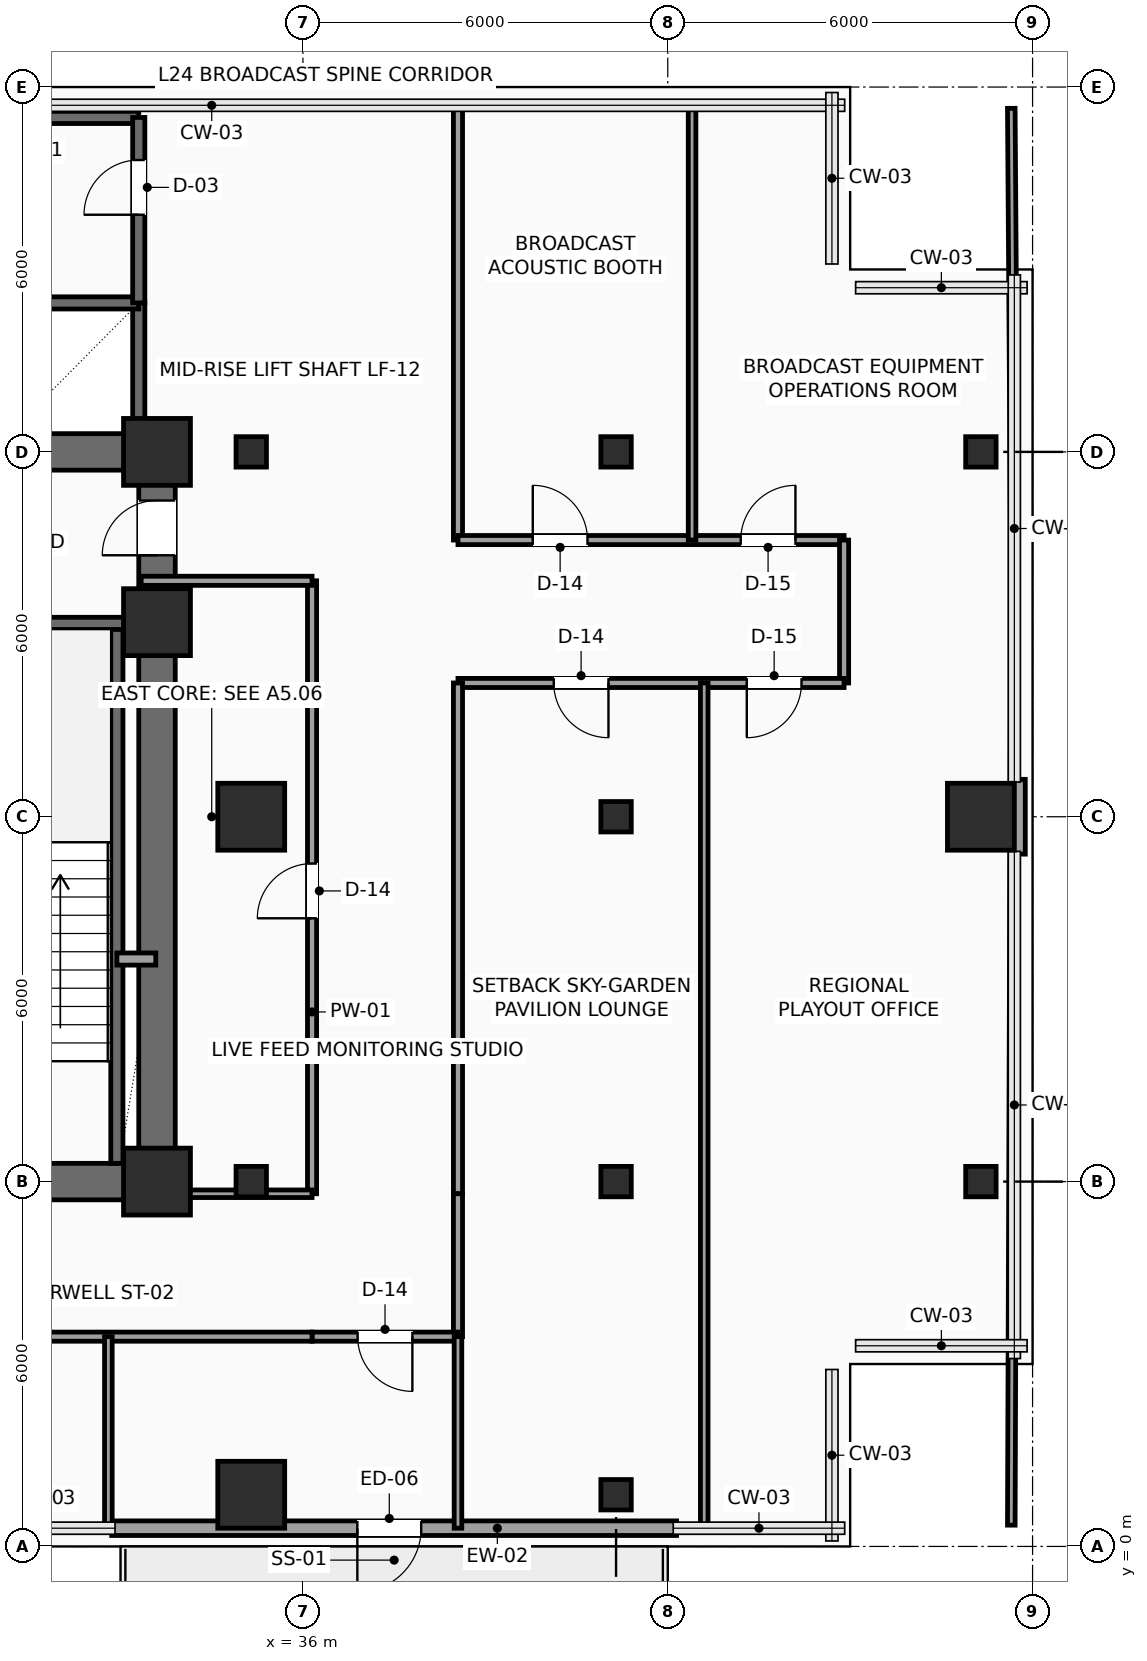
"""IFC4 building model, lengths in metres.
Left out: names, types, materials, properties, quantities, classifications, styles, units other than length and angle.
Written with IfcOpenShell. Run it as: python <this file> out.ifc"""

import sys

from ifc_helpers import new_model, si_unit, direction, frame, frame_2d, origin, origin_2d, place, context, subcontext, project, spatial, rectangle, hollow_rectangle, extrude, element, fill, save


model = new_model("IFC4")
c1 = context("Model", 3, precision=1e-05, world=origin(), true_north=direction((0.0, 1.0)))
c2 = subcontext(c1, "Body", "Model", "MODEL_VIEW")
j1 = project(units=[si_unit("LENGTHUNIT", "METRE"), si_unit("PLANEANGLEUNIT", "RADIAN")], contexts=[c1])
p1 = place(None, origin())
s1 = spatial("IfcSite", under=j1, at=p1, CompositionType="ELEMENT")
p2 = place(p1, origin())
s2 = spatial("IfcBuilding", under=s1, at=p2, CompositionType="ELEMENT")
p3 = place(p2, frame((0.0, 0.0, 103.35)))
s3 = spatial("IfcBuildingStorey", under=s2, at=p3, CompositionType="ELEMENT", Elevation=103.35)
for number, where, z_axis, x_axis in (
    (1, (33.6, 6.0, 0.0), (0.0, 0.0, 1.0), (1.0, 0.0, 0.0)),
    (2, (33.6, 15.2, 0.0), (0.0, 0.0, 1.0), (1.0, 0.0, 0.0)),
    (3, (33.6, 18.0, 0.0), (0.0, 0.0, 1.0), (1.0, 0.0, 0.0)),
    (4, (35.15, 0.85, 0.0), (0.0, 0.0, 1.0), (1.0, 0.0, 0.0)),
):
    element("IfcColumn", number, at=place(p3, frame(where, z_axis=z_axis, x_axis=x_axis)), inside=s3, PredefinedType="COLUMN", context=c2, shape_type="SweptSolid", body=[
        extrude(rectangle(XDim=1.1, YDim=1.1, at=origin_2d()), origin(), (0.0, 0.0, 1.0), 3.75),
    ])
p4 = place(p3, frame((35.15, 6.0, 0.0), z_axis=(0.0, 0.0, 1.0), x_axis=(1.0, 0.0, 0.0)))
e5 = element("IfcColumn", 5, at=p4, inside=s3, PredefinedType="COLUMN", context=c2, shape_type="SweptSolid", body=[
    extrude(hollow_rectangle(XDim=0.5, YDim=0.5, WallThickness=0.025, InnerFilletRadius=0.025, OuterFilletRadius=0.04, at=origin_2d()), origin(), (0.0, 0.0, 1.0), 3.75),
])
p5 = place(p3, frame((35.15, 12.0, 0.0), z_axis=(0.0, 0.0, 1.0), x_axis=(1.0, 0.0, 0.0)))
e6 = element("IfcColumn", 6, at=p5, inside=s3, PredefinedType="COLUMN", context=c2, shape_type="SweptSolid", body=[
    extrude(rectangle(XDim=1.1, YDim=1.1, at=origin_2d()), origin(), (0.0, 0.0, 1.0), 3.75),
])
for number, where, z_axis, x_axis in (
    (7, (35.15, 18.0, 0.0), (0.0, 0.0, 1.0), (1.0, 0.0, 0.0)),
    (8, (41.15, 0.85, 0.0), (0.0, 0.0, 1.0), (1.0, 0.0, 0.0)),
    (9, (41.15, 6.0, 0.0), (0.0, 0.0, 1.0), (1.0, 0.0, 0.0)),
    (10, (41.15, 12.0, 0.0), (0.0, 0.0, 1.0), (1.0, 0.0, 0.0)),
    (11, (41.15, 18.0, 0.0), (0.0, 0.0, 1.0), (1.0, 0.0, 0.0)),
    (12, (47.15, 6.0, 0.0), (0.0, 0.0, 1.0), (1.0, 0.0, 0.0)),
):
    element("IfcColumn", number, at=place(p3, frame(where, z_axis=z_axis, x_axis=x_axis)), inside=s3, PredefinedType="COLUMN", context=c2, shape_type="SweptSolid", body=[
        extrude(hollow_rectangle(XDim=0.5, YDim=0.5, WallThickness=0.025, InnerFilletRadius=0.025, OuterFilletRadius=0.04, at=origin_2d()), origin(), (0.0, 0.0, 1.0), 3.75),
    ])
p6 = place(p3, frame((47.15, 12.0, 0.0), z_axis=(0.0, 0.0, 1.0), x_axis=(1.0, 0.0, 0.0)))
e13 = element("IfcColumn", 13, at=p6, inside=s3, PredefinedType="COLUMN", context=c2, shape_type="SweptSolid", body=[
    extrude(rectangle(XDim=1.1, YDim=1.1, at=origin_2d()), origin(), (0.0, 0.0, 1.0), 3.75),
])
p7 = place(p3, frame((47.15, 18.0, 0.0), z_axis=(0.0, 0.0, 1.0), x_axis=(1.0, 0.0, 0.0)))
e14 = element("IfcColumn", 14, at=p7, inside=s3, PredefinedType="COLUMN", context=c2, shape_type="SweptSolid", body=[
    extrude(hollow_rectangle(XDim=0.5, YDim=0.5, WallThickness=0.025, InnerFilletRadius=0.025, OuterFilletRadius=0.04, at=origin_2d()), origin(), (0.0, 0.0, 1.0), 3.75),
])
p8 = place(p3, frame((42.145, 0.3, 0.0), z_axis=(0.0, 0.0, 1.0), x_axis=(-1.0, 0.0, 0.0)))
e15 = element("IfcWall", 15, at=p8, inside=s3, PredefinedType="SOLIDWALL", context=c2, shape_type="SweptSolid", body=[
    extrude(rectangle(XDim=9.29, YDim=0.24, at=frame_2d((4.645, 0.0))), origin(), (0.0, 0.0, 1.0), 3.525),
])
p9 = place(p8, frame((4.2, 0.0, 0.0)))
e16 = element("IfcOpeningElement", 16, at=p9, cuts=e15, PredefinedType="OPENING", context=c2, shape_type="SweptSolid", body=[
    extrude(rectangle(XDim=1.05, YDim=2.2, at=frame_2d((0.525, 1.1))), frame((0.0, 0.13, 0.0), z_axis=(0.0, -1.0, 0.0), x_axis=(1.0, 0.0, 0.0)), (0.0, 0.0, 1.0), 0.26),
])
p10 = place(p3, frame((47.76, 12.615, 0.0), z_axis=(0.0, 0.0, 1.0), x_axis=(0.0, -1.0, 0.0)))
e17 = element("IfcWall", 17, at=p10, inside=s3, PredefinedType="SOLIDWALL", context=c2, shape_type="SweptSolid", body=[
    extrude(rectangle(XDim=1.23, YDim=0.24, at=frame_2d((0.615, 0.0))), origin(), (0.0, 0.0, 1.0), 3.525),
])
for number, where, z_axis, x_axis in (
    (18, (24.0, 6.0, 0.0), (0.0, 0.0, 1.0), (1.0, 0.0, 0.0)),
    (19, (24.0, 18.0, 0.0), (0.0, 0.0, 1.0), (1.0, 0.0, 0.0)),
):
    element("IfcWall", number, at=place(p3, frame(where, z_axis=z_axis, x_axis=x_axis)), inside=s3, PredefinedType="SHEAR", context=c2, shape_type="SweptSolid", body=[
        extrude(rectangle(XDim=9.6, YDim=0.6, at=frame_2d((4.8, 0.0))), origin(), (0.0, 0.0, 1.0), 3.525),
    ])
p11 = place(p3, frame((33.6, 6.0, 0.0), z_axis=(0.0, 0.0, 1.0), x_axis=(0.0, 1.0, 0.0)))
e20 = element("IfcWall", 20, at=p11, inside=s3, PredefinedType="SHEAR", context=c2, shape_type="SweptSolid", body=[
    extrude(rectangle(XDim=12.0, YDim=0.6, at=frame_2d((6.0, 0.0))), origin(), (0.0, 0.0, 1.0), 3.525),
])
p12 = place(p11, frame((10.3, 0.0, 0.0)))
e21 = element("IfcOpeningElement", 21, at=p12, cuts=e20, PredefinedType="OPENING", context=c2, shape_type="SweptSolid", body=[
    extrude(rectangle(XDim=0.9, YDim=2.15, at=frame_2d((0.45, 1.075))), frame((0.0, 0.31, 0.0), z_axis=(0.0, -1.0, 0.0), x_axis=(1.0, 0.0, 0.0)), (0.0, 0.0, 1.0), 0.62),
])
p13 = place(p3, frame((32.94, 6.3, 0.0), z_axis=(0.0, 0.0, 1.0), x_axis=(0.0, 1.0, 0.0)))
e22 = element("IfcWall", 22, at=p13, inside=s3, PredefinedType="SHEAR", context=c2, shape_type="SweptSolid", body=[
    extrude(rectangle(XDim=8.88, YDim=0.2, at=frame_2d((4.44, 0.0))), origin(), (0.0, 0.0, 1.0), 3.525),
])
p14 = place(p3, frame((29.26, 15.18, 0.0), z_axis=(0.0, 0.0, 1.0), x_axis=(1.0, 0.0, 0.0)))
e23 = element("IfcWall", 23, at=p14, inside=s3, PredefinedType="SHEAR", context=c2, shape_type="SweptSolid", body=[
    extrude(rectangle(XDim=4.04, YDim=0.2, at=frame_2d((2.02, 0.0))), origin(), (0.0, 0.0, 1.0), 3.525),
])
p15 = place(p3, frame((32.94, 9.66, 0.0), z_axis=(0.0, 0.0, 1.0), x_axis=(1.0, 0.0, 0.0)))
e24 = element("IfcWall", 24, at=p15, inside=s3, PredefinedType="SOLIDWALL", context=c2, shape_type="SweptSolid", body=[
    extrude(rectangle(XDim=0.64, YDim=0.2, at=frame_2d((0.32, 0.0))), origin(), (0.0, 0.0, 1.0), 3.525),
])
p16 = place(p3, frame((33.3, 18.1, 0.0), z_axis=(0.0, 0.0, 1.0), x_axis=(0.0, 1.0, 0.0)))
e25 = element("IfcWall", 25, at=p16, inside=s3, PredefinedType="SHEAR", context=c2, shape_type="SweptSolid", body=[
    extrude(rectangle(XDim=2.35, YDim=0.2, at=frame_2d((1.175, 0.0))), origin(), (0.0, 0.0, 1.0), 3.525),
])
p17 = place(p3, frame((24.25, 20.45, 0.0), z_axis=(0.0, 0.0, 1.0), x_axis=(1.0, 0.0, 0.0)))
e26 = element("IfcWall", 26, at=p17, inside=s3, PredefinedType="SHEAR", context=c2, shape_type="SweptSolid", body=[
    extrude(rectangle(XDim=9.05, YDim=0.2, at=frame_2d((4.525, 0.0))), origin(), (0.0, 0.0, 1.0), 3.525),
])
p18 = place(p3, frame((24.15, 23.5, 0.0), z_axis=(0.0, 0.0, 1.0), x_axis=(1.0, 0.0, 0.0)))
e27 = element("IfcWall", 27, at=p18, inside=s3, PredefinedType="SHEAR", context=c2, shape_type="SweptSolid", body=[
    extrude(rectangle(XDim=9.15, YDim=0.2, at=frame_2d((4.575, 0.0))), origin(), (0.0, 0.0, 1.0), 3.525),
])
p19 = place(p3, frame((33.3, 20.45, 0.0), z_axis=(0.0, 0.0, 1.0), x_axis=(0.0, 1.0, 0.0)))
e28 = element("IfcWall", 28, at=p19, inside=s3, PredefinedType="SHEAR", context=c2, shape_type="SweptSolid", body=[
    extrude(rectangle(XDim=3.05, YDim=0.2, at=frame_2d((1.525, 0.0))), origin(), (0.0, 0.0, 1.0), 3.525),
])
p20 = place(p19, frame((1.45, 0.0, 0.0)))
e29 = element("IfcOpeningElement", 29, at=p20, cuts=e28, PredefinedType="OPENING", context=c2, shape_type="SweptSolid", body=[
    extrude(rectangle(XDim=0.9, YDim=2.15, at=frame_2d((0.45, 1.075))), frame((0.0, 0.11, 0.0), z_axis=(0.0, -1.0, 0.0), x_axis=(1.0, 0.0, 0.0)), (0.0, 0.0, 1.0), 0.22),
])
p21 = place(p3, frame((36.15, 5.8, 0.0), z_axis=(0.0, 0.0, 1.0), x_axis=(0.0, 1.0, 0.0)))
e30 = element("IfcWall", 30, at=p21, inside=s3, PredefinedType="PARTITIONING", context=c2, shape_type="SweptSolid", body=[
    extrude(rectangle(XDim=10.08, YDim=0.15, at=frame_2d((5.04, 0.0))), origin(), (0.0, 0.0, 1.0), 3.525),
])
p22 = place(p21, frame((4.53, 0.0, 0.0)))
e31 = element("IfcOpeningElement", 31, at=p22, cuts=e30, PredefinedType="OPENING", context=c2, shape_type="SweptSolid", body=[
    extrude(rectangle(XDim=0.9, YDim=2.1, at=frame_2d((0.45, 1.05))), frame((0.0, 0.085, 0.0), z_axis=(0.0, -1.0, 0.0), x_axis=(1.0, 0.0, 0.0)), (0.0, 0.0, 1.0), 0.17),
])
p23 = place(p3, frame((36.15, 15.88, 0.0), z_axis=(0.0, 0.0, 1.0), x_axis=(-1.0, 0.0, 0.0)))
e32 = element("IfcWall", 32, at=p23, inside=s3, PredefinedType="PARTITIONING", context=c2, shape_type="SweptSolid", body=[
    extrude(rectangle(XDim=2.81, YDim=0.15, at=frame_2d((1.405, 0.0))), origin(), (0.0, 0.0, 1.0), 3.525),
])
p24 = place(p3, frame((38.55, 23.7, 0.0), z_axis=(0.0, 0.0, 1.0), x_axis=(0.0, -1.0, 0.0)))
e33 = element("IfcWall", 33, at=p24, inside=s3, PredefinedType="PARTITIONING", context=c2, shape_type="SweptSolid", body=[
    extrude(rectangle(XDim=7.15, YDim=0.15, at=frame_2d((3.575, 0.0))), origin(), (0.0, 0.0, 1.0), 3.525),
])
p25 = place(p3, frame((38.55, 16.55, 0.0), z_axis=(0.0, 0.0, 1.0), x_axis=(1.0, 0.0, 0.0)))
e34 = element("IfcWall", 34, at=p25, inside=s3, PredefinedType="PARTITIONING", context=c2, shape_type="SweptSolid", body=[
    extrude(rectangle(XDim=6.35, YDim=0.15, at=frame_2d((3.175, 0.0))), origin(), (0.0, 0.0, 1.0), 3.525),
])
p26 = place(p25, frame((1.23, 0.0, 0.0)))
e35 = element("IfcOpeningElement", 35, at=p26, cuts=e34, PredefinedType="OPENING", context=c2, shape_type="SweptSolid", body=[
    extrude(rectangle(XDim=0.9, YDim=2.1, at=frame_2d((0.45, 1.05))), frame((0.0, 0.085, 0.0), z_axis=(0.0, -1.0, 0.0), x_axis=(1.0, 0.0, 0.0)), (0.0, 0.0, 1.0), 0.17),
])
p27 = place(p25, frame((4.65, 0.0, 0.0)))
e36 = element("IfcOpeningElement", 36, at=p27, cuts=e34, PredefinedType="OPENING", context=c2, shape_type="SweptSolid", body=[
    extrude(rectangle(XDim=0.9, YDim=2.1, at=frame_2d((0.45, 1.05))), frame((0.0, 0.085, 0.0), z_axis=(0.0, -1.0, 0.0), x_axis=(1.0, 0.0, 0.0)), (0.0, 0.0, 1.0), 0.17),
])
p28 = place(p3, frame((44.9, 16.55, 0.0), z_axis=(0.0, 0.0, 1.0), x_axis=(0.0, -1.0, 0.0)))
e37 = element("IfcWall", 37, at=p28, inside=s3, PredefinedType="PARTITIONING", context=c2, shape_type="SweptSolid", body=[
    extrude(rectangle(XDim=2.35, YDim=0.15, at=frame_2d((1.175, 0.0))), origin(), (0.0, 0.0, 1.0), 3.525),
])
p29 = place(p3, frame((44.9, 14.2, 0.0), z_axis=(0.0, 0.0, 1.0), x_axis=(-1.0, 0.0, 0.0)))
e38 = element("IfcWall", 38, at=p29, inside=s3, PredefinedType="PARTITIONING", context=c2, shape_type="SweptSolid", body=[
    extrude(rectangle(XDim=6.35, YDim=0.15, at=frame_2d((3.175, 0.0))), origin(), (0.0, 0.0, 1.0), 3.525),
])
p30 = place(p29, frame((3.875, 0.0, 0.0)))
e39 = element("IfcOpeningElement", 39, at=p30, cuts=e38, PredefinedType="OPENING", context=c2, shape_type="SweptSolid", body=[
    extrude(rectangle(XDim=0.9, YDim=2.1, at=frame_2d((0.45, 1.05))), frame((0.0, 0.085, 0.0), z_axis=(0.0, -1.0, 0.0), x_axis=(1.0, 0.0, 0.0)), (0.0, 0.0, 1.0), 0.17),
])
p31 = place(p29, frame((0.7, 0.0, 0.0)))
e40 = element("IfcOpeningElement", 40, at=p31, cuts=e38, PredefinedType="OPENING", context=c2, shape_type="SweptSolid", body=[
    extrude(rectangle(XDim=0.9, YDim=2.1, at=frame_2d((0.45, 1.05))), frame((0.0, 0.085, 0.0), z_axis=(0.0, -1.0, 0.0), x_axis=(1.0, 0.0, 0.0)), (0.0, 0.0, 1.0), 0.17),
])
p32 = place(p3, frame((38.55, 14.2, 0.0), z_axis=(0.0, 0.0, 1.0), x_axis=(0.0, -1.0, 0.0)))
e41 = element("IfcWall", 41, at=p32, inside=s3, PredefinedType="PARTITIONING", context=c2, shape_type="SweptSolid", body=[
    extrude(rectangle(XDim=8.4, YDim=0.15, at=frame_2d((4.2, 0.0))), origin(), (0.0, 0.0, 1.0), 3.525),
])
p33 = place(p3, frame((38.55, 5.8, 0.0), z_axis=(0.0, 0.0, 1.0), x_axis=(0.0, -1.0, 0.0)))
e42 = element("IfcWall", 42, at=p33, inside=s3, PredefinedType="PARTITIONING", context=c2, shape_type="SweptSolid", body=[
    extrude(rectangle(XDim=2.35, YDim=0.15, at=frame_2d((1.175, 0.0))), origin(), (0.0, 0.0, 1.0), 3.525),
])
p34 = place(p3, frame((38.55, 3.45, 0.0), z_axis=(0.0, 0.0, 1.0), x_axis=(-1.0, 0.0, 0.0)))
e43 = element("IfcWall", 43, at=p34, inside=s3, PredefinedType="PARTITIONING", context=c2, shape_type="SweptSolid", body=[
    extrude(rectangle(XDim=2.4, YDim=0.15, at=frame_2d((1.2, 0.0))), origin(), (0.0, 0.0, 1.0), 3.067),
])
p35 = place(p34, frame((0.75, 0.0, 0.0)))
e44 = element("IfcOpeningElement", 44, at=p35, cuts=e43, PredefinedType="OPENING", context=c2, shape_type="SweptSolid", body=[
    extrude(rectangle(XDim=0.9, YDim=2.1, at=frame_2d((0.45, 1.05))), frame((0.0, 0.085, 0.0), z_axis=(0.0, -1.0, 0.0), x_axis=(1.0, 0.0, 0.0)), (0.0, 0.0, 1.0), 0.17),
])
p36 = place(p3, frame((36.15, 3.45, 0.0), z_axis=(0.0, 0.0, 1.0), x_axis=(-1.0, 0.0, 0.0)))
e45 = element("IfcWall", 45, at=p36, inside=s3, PredefinedType="PARTITIONING", context=c2, shape_type="SweptSolid", body=[
    extrude(rectangle(XDim=14.6, YDim=0.15, at=frame_2d((7.3, 0.0))), origin(), (0.0, 0.0, 1.0), 3.067),
])
p37 = place(p36, frame((11.325, 0.0, 0.0)))
e46 = element("IfcOpeningElement", 46, at=p37, cuts=e45, PredefinedType="OPENING", context=c2, shape_type="SweptSolid", body=[
    extrude(rectangle(XDim=0.9, YDim=2.1, at=frame_2d((0.45, 1.05))), frame((0.0, 0.085, 0.0), z_axis=(0.0, -1.0, 0.0), x_axis=(1.0, 0.0, 0.0)), (0.0, 0.0, 1.0), 0.17),
])
p38 = place(p36, frame((5.7, 0.0, 0.0)))
e47 = element("IfcOpeningElement", 47, at=p38, cuts=e45, PredefinedType="OPENING", context=c2, shape_type="SweptSolid", body=[
    extrude(rectangle(XDim=0.9, YDim=2.1, at=frame_2d((0.45, 1.05))), frame((0.0, 0.085, 0.0), z_axis=(0.0, -1.0, 0.0), x_axis=(1.0, 0.0, 0.0)), (0.0, 0.0, 1.0), 0.17),
])
p39 = place(p3, frame((42.6, 0.3, 0.0), z_axis=(0.0, 0.0, 1.0), x_axis=(0.0, 1.0, 0.0)))
e48 = element("IfcWall", 48, at=p39, inside=s3, PredefinedType="PARTITIONING", context=c2, shape_type="SweptSolid", body=[
    extrude(rectangle(XDim=13.9, YDim=0.125, at=frame_2d((6.95, 0.0))), origin(), (0.0, 0.0, 1.0), 3.525),
])
p40 = place(p3, frame((47.65, 0.35, 0.0), z_axis=(0.0, 0.0, 1.0), x_axis=(0.003606251025, 0.999993497456, 0.0)))
e49 = element("IfcWall", 49, at=p40, inside=s3, PredefinedType="PARTITIONING", context=c2, shape_type="SweptSolid", body=[
    extrude(rectangle(XDim=11.035, YDim=0.125, at=frame_2d((5.518, 0.0))), origin(), (0.0, 0.0, 1.0), 3.525),
])
p41 = place(p3, frame((47.694, 12.615, 0.0), z_axis=(0.0, 0.0, 1.0), x_axis=(0.003542799701, 0.999993724265, 0.0)))
e50 = element("IfcWall", 50, at=p41, inside=s3, PredefinedType="PARTITIONING", context=c2, shape_type="SweptSolid", body=[
    extrude(rectangle(XDim=1.585, YDim=0.125, at=frame_2d((0.792, 0.0))), origin(), (0.0, 0.0, 1.0), 3.525),
])
p42 = place(p3, frame((42.4, 16.55, 0.0), z_axis=(0.0, 0.0, 1.0), x_axis=(0.0, 1.0, 0.0)))
e51 = element("IfcWall", 51, at=p42, inside=s3, PredefinedType="PARTITIONING", context=c2, shape_type="SweptSolid", body=[
    extrude(rectangle(XDim=7.15, YDim=0.125, at=frame_2d((3.575, 0.0))), origin(), (0.0, 0.0, 1.0), 3.525),
])
p43 = place(p3, frame((47.7, 16.55, 0.0), z_axis=(0.0, 0.0, 1.0), x_axis=(-0.007049101019, 0.999975154779, 0.0)))
e52 = element("IfcWall", 52, at=p43, inside=s3, PredefinedType="PARTITIONING", context=c2, shape_type="SweptSolid", body=[
    extrude(rectangle(XDim=7.1, YDim=0.125, at=frame_2d((3.55, 0.0))), origin(), (0.0, 0.0, 1.0), 3.525),
])
for number, where, z_axis, x_axis in (
    (53, (32.8, 0.3, 0.0), (0.0, 0.0, 1.0), (0.0, 1.0, 0.0)),
    (54, (38.55, 0.3, 0.0), (0.0, 0.0, 1.0), (0.0, 1.0, 0.0)),
):
    element("IfcWall", number, at=place(p3, frame(where, z_axis=z_axis, x_axis=x_axis)), inside=s3, PredefinedType="PARTITIONING", context=c2, shape_type="SweptSolid", body=[
        extrude(rectangle(XDim=3.15, YDim=0.125, at=frame_2d((1.575, 0.0))), origin(), (0.0, 0.0, 1.0), 3.525),
    ])
p44 = place(p3, frame((33.65, 5.8, 0.0), z_axis=(0.0, 0.0, 1.0), x_axis=(1.0, 0.0, 0.0)))
e55 = element("IfcWall", 55, at=p44, inside=s3, PredefinedType="PARTITIONING", context=c2, shape_type="SweptSolid", body=[
    extrude(rectangle(XDim=2.5, YDim=0.125, at=frame_2d((1.25, 0.0))), origin(), (0.0, 0.0, 1.0), 3.017),
])
p45 = place(p9, origin())
e56 = element("IfcDoor", 56, at=p45, inside=s3, OperationType="SINGLE_SWING_RIGHT", PredefinedType="DOOR", context=c2, shape_type="SweptSolid", body=[
    extrude(rectangle(XDim=1.05, YDim=2.2, at=frame_2d((0.525, 1.1))), frame((0.0, 0.025, 0.0), z_axis=(0.0, -1.0, 0.0), x_axis=(1.0, 0.0, 0.0)), (0.0, 0.0, 1.0), 0.05),
])
fill(e16, e56)
p46 = place(p12, origin())
e57 = element("IfcDoor", 57, at=p46, inside=s3, OperationType="SINGLE_SWING_LEFT", PredefinedType="DOOR", context=c2, shape_type="SweptSolid", body=[
    extrude(rectangle(XDim=0.9, YDim=2.15, at=frame_2d((0.45, 1.075))), frame((0.0, 0.025, 0.0), z_axis=(0.0, -1.0, 0.0), x_axis=(1.0, 0.0, 0.0)), (0.0, 0.0, 1.0), 0.05),
])
fill(e21, e57)
p47 = place(p20, origin())
e58 = element("IfcDoor", 58, at=p47, inside=s3, OperationType="SINGLE_SWING_LEFT", PredefinedType="DOOR", context=c2, shape_type="SweptSolid", body=[
    extrude(rectangle(XDim=0.9, YDim=2.15, at=frame_2d((0.45, 1.075))), frame((0.0, 0.025, 0.0), z_axis=(0.0, -1.0, 0.0), x_axis=(1.0, 0.0, 0.0)), (0.0, 0.0, 1.0), 0.05),
])
fill(e29, e58)
p48 = place(p22, origin())
e59 = element("IfcDoor", 59, at=p48, inside=s3, OperationType="SINGLE_SWING_LEFT", PredefinedType="DOOR", context=c2, shape_type="SweptSolid", body=[
    extrude(rectangle(XDim=0.9, YDim=2.1, at=frame_2d((0.45, 1.05))), frame((0.0, 0.025, 0.0), z_axis=(0.0, -1.0, 0.0), x_axis=(1.0, 0.0, 0.0)), (0.0, 0.0, 1.0), 0.05),
])
fill(e31, e59)
p49 = place(p26, origin())
e60 = element("IfcDoor", 60, at=p49, inside=s3, OperationType="SINGLE_SWING_LEFT", PredefinedType="DOOR", context=c2, shape_type="SweptSolid", body=[
    extrude(rectangle(XDim=0.9, YDim=2.1, at=frame_2d((0.45, 1.05))), frame((0.0, 0.025, 0.0), z_axis=(0.0, -1.0, 0.0), x_axis=(1.0, 0.0, 0.0)), (0.0, 0.0, 1.0), 0.05),
])
fill(e35, e60)
p50 = place(p27, origin())
e61 = element("IfcDoor", 61, at=p50, inside=s3, OperationType="SINGLE_SWING_RIGHT", PredefinedType="DOOR", context=c2, shape_type="SweptSolid", body=[
    extrude(rectangle(XDim=0.9, YDim=2.1, at=frame_2d((0.45, 1.05))), frame((0.0, 0.025, 0.0), z_axis=(0.0, -1.0, 0.0), x_axis=(1.0, 0.0, 0.0)), (0.0, 0.0, 1.0), 0.05),
])
fill(e36, e61)
p51 = place(p30, origin())
e62 = element("IfcDoor", 62, at=p51, inside=s3, OperationType="SINGLE_SWING_LEFT", PredefinedType="DOOR", context=c2, shape_type="SweptSolid", body=[
    extrude(rectangle(XDim=0.9, YDim=2.1, at=frame_2d((0.45, 1.05))), frame((0.0, 0.025, 0.0), z_axis=(0.0, -1.0, 0.0), x_axis=(1.0, 0.0, 0.0)), (0.0, 0.0, 1.0), 0.05),
])
fill(e39, e62)
p52 = place(p31, origin())
e63 = element("IfcDoor", 63, at=p52, inside=s3, OperationType="SINGLE_SWING_RIGHT", PredefinedType="DOOR", context=c2, shape_type="SweptSolid", body=[
    extrude(rectangle(XDim=0.9, YDim=2.1, at=frame_2d((0.45, 1.05))), frame((0.0, 0.025, 0.0), z_axis=(0.0, -1.0, 0.0), x_axis=(1.0, 0.0, 0.0)), (0.0, 0.0, 1.0), 0.05),
])
fill(e40, e63)
p53 = place(p35, origin())
e64 = element("IfcDoor", 64, at=p53, inside=s3, OperationType="SINGLE_SWING_LEFT", PredefinedType="DOOR", context=c2, shape_type="SweptSolid", body=[
    extrude(rectangle(XDim=0.9, YDim=2.1, at=frame_2d((0.45, 1.05))), frame((0.0, 0.025, 0.0), z_axis=(0.0, -1.0, 0.0), x_axis=(1.0, 0.0, 0.0)), (0.0, 0.0, 1.0), 0.05),
])
fill(e44, e64)
save(model, sys.argv[1])
